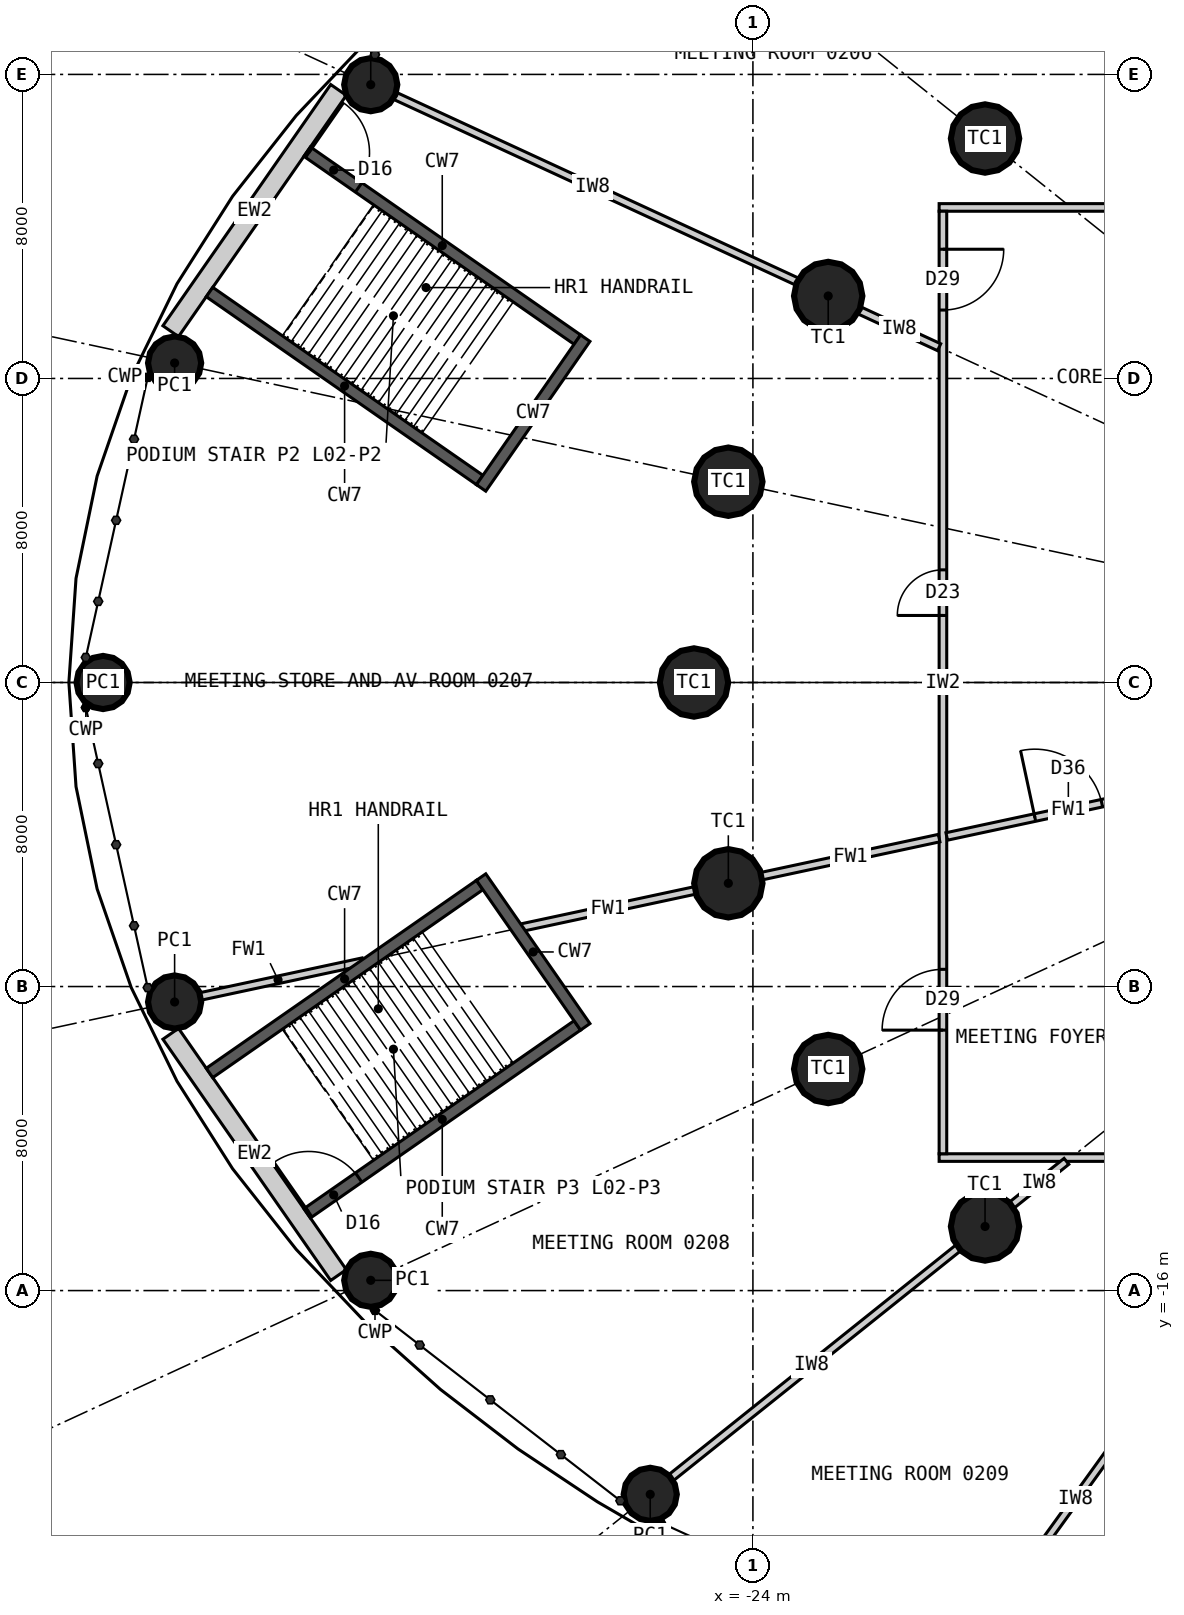
"""IFC4 building model, lengths in metres.
Left out: names, types, materials, properties, quantities, classifications, styles, units other than length and angle.
Written with IfcOpenShell. Run it as: python <this file> out.ifc"""

import sys

from ifc_helpers import new_model, si_unit, direction, frame, frame_2d, origin, origin_2d, place, context, subcontext, project, spatial, rectangle, circle, extrude, element, fill, save


model = new_model("IFC4")
c1 = context("Model", 3, precision=1e-05, world=origin(), true_north=direction((0.0, 1.0)))
c2 = subcontext(c1, "Body", "Model", "MODEL_VIEW")
j1 = project(units=[si_unit("LENGTHUNIT", "METRE"), si_unit("PLANEANGLEUNIT", "RADIAN")], contexts=[c1])
p1 = place(None, origin())
s1 = spatial("IfcSite", under=j1, at=p1, CompositionType="ELEMENT")
p2 = place(p1, origin())
s2 = spatial("IfcBuilding", under=s1, at=p2, CompositionType="ELEMENT")
p3 = place(p2, frame((0.0, 0.0, 13.8)))
s3 = spatial("IfcBuildingStorey", under=s2, at=p3, CompositionType="ELEMENT", Elevation=13.8)
for number, where, z_axis, x_axis in (
    (1, (-17.892, 14.313, 0.0), (0.0, 0.0, 1.0), (1.0, 0.0, 0.0)),
    (2, (-22.019, 10.17, 0.0), (0.0, 0.0, 1.0), (1.0, 0.0, 0.0)),
    (3, (-24.647, 5.283, 0.0), (0.0, 0.0, 1.0), (1.0, 0.0, 0.0)),
    (4, (-25.55, 0.0, 0.0), (0.0, 0.0, 1.0), (1.0, 0.0, 0.0)),
    (5, (-24.647, -5.283, 0.0), (0.0, 0.0, 1.0), (1.0, 0.0, 0.0)),
    (6, (-22.019, -10.17, 0.0), (0.0, 0.0, 1.0), (1.0, 0.0, 0.0)),
    (7, (-17.892, -14.313, 0.0), (0.0, 0.0, 1.0), (1.0, 0.0, 0.0)),
):
    element("IfcColumn", number, at=place(p3, frame(where, z_axis=z_axis, x_axis=x_axis)), inside=s3, PredefinedType="COLUMN", context=c2, shape_type="SweptSolid", body=[
        extrude(circle(Radius=0.9, at=origin_2d()), origin(), (0.0, 0.0, 1.0), 5.4),
    ])
for number, where, z_axis, x_axis in (
    (8, (-34.057, 15.73, 0.0), (0.0, 0.0, 1.0), (1.0, 0.0, 0.0)),
    (9, (-39.218, 8.407, 0.0), (0.0, 0.0, 1.0), (1.0, 0.0, 0.0)),
    (10, (-41.1, 0.0, 0.0), (0.0, 0.0, 1.0), (1.0, 0.0, 0.0)),
    (11, (-39.218, -8.407, 0.0), (0.0, 0.0, 1.0), (1.0, 0.0, 0.0)),
    (12, (-34.057, -15.73, 0.0), (0.0, 0.0, 1.0), (1.0, 0.0, 0.0)),
    (13, (-26.702, -21.362, 0.0), (0.0, 0.0, 1.0), (1.0, 0.0, 0.0)),
):
    element("IfcColumn", number, at=place(p3, frame(where, z_axis=z_axis, x_axis=x_axis)), inside=s3, PredefinedType="COLUMN", context=c2, shape_type="SweptSolid", body=[
        extrude(circle(Radius=0.7, at=origin_2d()), origin(), (0.0, 0.0, 1.0), 5.4),
    ])
for number, where, z_axis, x_axis in (
    (14, (-34.905, 15.592, 0.0), (0.0, 0.0, 1.0), (-0.571, -0.821, 0.0)),
    (15, (-39.32, -9.244, 0.0), (0.0, 0.0, 1.0), (0.571, -0.821, 0.0)),
):
    element("IfcWall", number, at=place(p3, frame(where, z_axis=z_axis, x_axis=x_axis)), inside=s3, PredefinedType="SOLIDWALL", context=c2, shape_type="SweptSolid", body=[
        extrude(rectangle(XDim=7.733, YDim=0.5, at=frame_2d((3.866, 0.0))), origin(), (0.0, 0.0, 1.0), 5.15),
    ])
p4 = place(p3, frame((-19.1, 12.5, 0.0), z_axis=(0.0, 0.0, 1.0), x_axis=(1.0, 0.0, 0.0)))
e16 = element("IfcWall", 16, at=p4, inside=s3, PredefinedType="PARTITIONING", context=c2, shape_type="SweptSolid", body=[
    extrude(rectangle(XDim=38.2, YDim=0.2, at=frame_2d((19.1, 0.0))), origin(), (0.0, 0.0, 1.0), 5.15),
])
p5 = place(p4, frame((26.32, 0.0, 0.0)))
e17 = element("IfcOpeningElement", 17, at=p5, cuts=e16, PredefinedType="OPENING", context=c2, shape_type="SweptSolid", body=[
    extrude(rectangle(XDim=1.6, YDim=2.4, at=frame_2d((0.8, 1.2))), frame((0.0, 0.11, 0.0), z_axis=(0.0, -1.0, 0.0), x_axis=(1.0, 0.0, 0.0)), (0.0, 0.0, 1.0), 0.22),
])
p6 = place(p4, frame((20.71, 0.0, 0.0)))
e18 = element("IfcOpeningElement", 18, at=p6, cuts=e16, PredefinedType="OPENING", context=c2, shape_type="SweptSolid", body=[
    extrude(rectangle(XDim=1.0, YDim=2.1, at=frame_2d((0.5, 1.05))), frame((0.0, 0.11, 0.0), z_axis=(0.0, -1.0, 0.0), x_axis=(1.0, 0.0, 0.0)), (0.0, 0.0, 1.0), 0.22),
])
p7 = place(p4, frame((16.49, 0.0, 0.0)))
e19 = element("IfcOpeningElement", 19, at=p7, cuts=e16, PredefinedType="OPENING", context=c2, shape_type="SweptSolid", body=[
    extrude(rectangle(XDim=1.0, YDim=2.1, at=frame_2d((0.5, 1.05))), frame((0.0, 0.11, 0.0), z_axis=(0.0, -1.0, 0.0), x_axis=(1.0, 0.0, 0.0)), (0.0, 0.0, 1.0), 0.22),
])
p8 = place(p4, frame((11.943, 0.0, 0.0)))
e20 = element("IfcOpeningElement", 20, at=p8, cuts=e16, PredefinedType="OPENING", context=c2, shape_type="SweptSolid", body=[
    extrude(rectangle(XDim=1.0, YDim=2.2, at=frame_2d((0.5, 1.1))), frame((0.0, 0.11, 0.0), z_axis=(0.0, -1.0, 0.0), x_axis=(1.0, 0.0, 0.0)), (0.0, 0.0, 1.0), 0.22),
])
p9 = place(p4, frame((5.1, 0.0, 0.0)))
e21 = element("IfcOpeningElement", 21, at=p9, cuts=e16, PredefinedType="OPENING", context=c2, shape_type="SweptSolid", body=[
    extrude(rectangle(XDim=1.6, YDim=2.4, at=frame_2d((0.8, 1.2))), frame((0.0, 0.11, 0.0), z_axis=(0.0, -1.0, 0.0), x_axis=(1.0, 0.0, 0.0)), (0.0, 0.0, 1.0), 0.22),
])
p10 = place(p4, frame((33.02, 0.0, 0.0)))
e22 = element("IfcOpeningElement", 22, at=p10, cuts=e16, PredefinedType="OPENING", context=c2, shape_type="SweptSolid", body=[
    extrude(rectangle(XDim=1.6, YDim=2.4, at=frame_2d((0.8, 1.2))), frame((0.0, 0.11, 0.0), z_axis=(0.0, -1.0, 0.0), x_axis=(1.0, 0.0, 0.0)), (0.0, 0.0, 1.0), 0.22),
])
p11 = place(p3, frame((19.1, -12.5, 0.0), z_axis=(0.0, 0.0, 1.0), x_axis=(-1.0, 0.0, 0.0)))
e23 = element("IfcWall", 23, at=p11, inside=s3, PredefinedType="PARTITIONING", context=c2, shape_type="SweptSolid", body=[
    extrude(rectangle(XDim=38.2, YDim=0.2, at=frame_2d((19.1, 0.0))), origin(), (0.0, 0.0, 1.0), 5.15),
])
p12 = place(p11, frame((30.722, 0.0, 0.0)))
e24 = element("IfcOpeningElement", 24, at=p12, cuts=e23, PredefinedType="OPENING", context=c2, shape_type="SweptSolid", body=[
    extrude(rectangle(XDim=1.6, YDim=2.4, at=frame_2d((0.8, 1.2))), frame((0.0, 0.11, 0.0), z_axis=(0.0, -1.0, 0.0), x_axis=(1.0, 0.0, 0.0)), (0.0, 0.0, 1.0), 0.22),
])
p13 = place(p11, frame((19.079, 0.0, 0.0)))
e25 = element("IfcOpeningElement", 25, at=p13, cuts=e23, PredefinedType="OPENING", context=c2, shape_type="SweptSolid", body=[
    extrude(rectangle(XDim=1.8, YDim=2.4, at=frame_2d((0.9, 1.2))), frame((0.0, 0.11, 0.0), z_axis=(0.0, -1.0, 0.0), x_axis=(1.0, 0.0, 0.0)), (0.0, 0.0, 1.0), 0.22),
])
p14 = place(p11, frame((25.979, 0.0, 0.0)))
e26 = element("IfcOpeningElement", 26, at=p14, cuts=e23, PredefinedType="OPENING", context=c2, shape_type="SweptSolid", body=[
    extrude(rectangle(XDim=1.8, YDim=2.4, at=frame_2d((0.9, 1.2))), frame((0.0, 0.11, 0.0), z_axis=(0.0, -1.0, 0.0), x_axis=(1.0, 0.0, 0.0)), (0.0, 0.0, 1.0), 0.22),
])
p15 = place(p3, frame((-19.0, 12.4, 0.0), z_axis=(0.0, 0.0, 1.0), x_axis=(0.0, -1.0, 0.0)))
e27 = element("IfcWall", 27, at=p15, inside=s3, PredefinedType="PARTITIONING", context=c2, shape_type="SweptSolid", body=[
    extrude(rectangle(XDim=24.8, YDim=0.2, at=frame_2d((12.4, 0.0))), origin(), (0.0, 0.0, 1.0), 5.15),
])
p16 = place(p15, frame((9.436, 0.0, 0.0)))
e28 = element("IfcOpeningElement", 28, at=p16, cuts=e27, PredefinedType="OPENING", context=c2, shape_type="SweptSolid", body=[
    extrude(rectangle(XDim=1.2, YDim=2.2, at=frame_2d((0.6, 1.1))), frame((0.0, 0.11, 0.0), z_axis=(0.0, -1.0, 0.0), x_axis=(1.0, 0.0, 0.0)), (0.0, 0.0, 1.0), 0.22),
])
p17 = place(p15, frame((19.947, 0.0, 0.0)))
e29 = element("IfcOpeningElement", 29, at=p17, cuts=e27, PredefinedType="OPENING", context=c2, shape_type="SweptSolid", body=[
    extrude(rectangle(XDim=1.6, YDim=2.4, at=frame_2d((0.8, 1.2))), frame((0.0, 0.11, 0.0), z_axis=(0.0, -1.0, 0.0), x_axis=(1.0, 0.0, 0.0)), (0.0, 0.0, 1.0), 0.22),
])
p18 = place(p15, frame((1.0, 0.0, 0.0)))
e30 = element("IfcOpeningElement", 30, at=p18, cuts=e27, PredefinedType="OPENING", context=c2, shape_type="SweptSolid", body=[
    extrude(rectangle(XDim=1.6, YDim=2.4, at=frame_2d((0.8, 1.2))), frame((0.0, 0.11, 0.0), z_axis=(0.0, -1.0, 0.0), x_axis=(1.0, 0.0, 0.0)), (0.0, 0.0, 1.0), 0.22),
])
p19 = place(p3, frame((-19.1, 8.822, 0.0), z_axis=(0.0, 0.0, 1.0), x_axis=(-0.907872952542, 0.419245395971, 0.0)))
e31 = element("IfcWall", 31, at=p19, inside=s3, PredefinedType="PARTITIONING", context=c2, shape_type="SweptSolid", body=[
    extrude(rectangle(XDim=2.315, YDim=0.2, at=frame_2d((1.158, 0.0))), origin(), (0.0, 0.0, 1.0), 4.45),
])
p20 = place(p3, frame((-22.836, 10.548, 0.0), z_axis=(0.0, 0.0, 1.0), x_axis=(-0.90784065247, 0.419315334471, 0.0)))
e32 = element("IfcWall", 32, at=p20, inside=s3, PredefinedType="PARTITIONING", context=c2, shape_type="SweptSolid", body=[
    extrude(rectangle(XDim=11.86, YDim=0.2, at=frame_2d((5.93, 0.0))), origin(), (0.0, 0.0, 1.0), 4.25),
])
p21 = place(p3, frame((-19.1, -4.094, 0.0), z_axis=(0.0, 0.0, 1.0), x_axis=(-0.977784445586, -0.209612924148, 0.0)))
e33 = element("IfcWall", 33, at=p21, inside=s3, PredefinedType="PARTITIONING", context=c2, shape_type="SweptSolid", body=[
    extrude(rectangle(XDim=4.773, YDim=0.2, at=frame_2d((2.386, 0.0))), origin(), (0.0, 0.0, 1.0), 4.3),
])
p22 = place(p3, frame((-25.527, -5.472, 0.0), z_axis=(0.0, 0.0, 1.0), x_axis=(-0.977787143577, -0.209600338396, 0.0)))
e34 = element("IfcWall", 34, at=p22, inside=s3, PredefinedType="PARTITIONING", context=c2, shape_type="SweptSolid", body=[
    extrude(rectangle(XDim=4.68, YDim=0.2, at=frame_2d((2.34, 0.0))), origin(), (0.0, 0.0, 1.0), 4.25),
])
p23 = place(p3, frame((-34.263, -7.345, 0.0), z_axis=(0.0, 0.0, 1.0), x_axis=(-0.977794589892, -0.209565598271, 0.0)))
e35 = element("IfcWall", 35, at=p23, inside=s3, PredefinedType="PARTITIONING", context=c2, shape_type="SweptSolid", body=[
    extrude(rectangle(XDim=4.567, YDim=0.2, at=frame_2d((2.283, 0.0))), origin(), (0.0, 0.0, 1.0), 4.25),
])
p24 = place(p3, frame((-15.75, -12.6, 0.0), z_axis=(0.0, 0.0, 1.0), x_axis=(-0.780881734892, -0.6246788904, 0.0)))
e36 = element("IfcWall", 36, at=p24, inside=s3, PredefinedType="PARTITIONING", context=c2, shape_type="SweptSolid", body=[
    extrude(rectangle(XDim=1.843, YDim=0.2, at=frame_2d((0.921, 0.0))), origin(), (0.0, 0.0, 1.0), 4.3),
])
p25 = place(p3, frame((-18.594, -14.875, 0.0), z_axis=(0.0, 0.0, 1.0), x_axis=(-0.780868809443, -0.624695047554, 0.0)))
e37 = element("IfcWall", 37, at=p25, inside=s3, PredefinedType="PARTITIONING", context=c2, shape_type="SweptSolid", body=[
    extrude(rectangle(XDim=9.883, YDim=0.2, at=frame_2d((4.941, 0.0))), origin(), (0.0, 0.0, 1.0), 4.25),
])
p26 = place(p3, frame((-13.118, -18.176, 0.0), z_axis=(0.0, 0.0, 1.0), x_axis=(-0.585204349301, -0.810885854828, 0.0)))
e38 = element("IfcWall", 38, at=p26, inside=s3, PredefinedType="PARTITIONING", context=c2, shape_type="SweptSolid", body=[
    extrude(rectangle(XDim=8.161, YDim=0.2, at=frame_2d((4.081, 0.0))), origin(), (0.0, 0.0, 1.0), 4.25),
])
p27 = place(p3, frame((-35.729, 13.968, 0.0), z_axis=(0.0, 0.0, 1.0), x_axis=(0.82092761123, -0.571032273274, 0.0)))
e39 = element("IfcWall", 39, at=p27, inside=s3, PredefinedType="SHEAR", context=c2, shape_type="SweptSolid", body=[
    extrude(rectangle(XDim=8.66, YDim=0.3, at=frame_2d((4.33, 0.0))), origin(), (0.0, 0.0, 1.0), 5.4),
])
p28 = place(p27, frame((0.05, 0.0, 0.0)))
e40 = element("IfcOpeningElement", 40, at=p28, cuts=e39, PredefinedType="OPENING", context=c2, shape_type="SweptSolid", body=[
    extrude(rectangle(XDim=1.6, YDim=2.1, at=frame_2d((0.8, 1.05))), frame((0.0, 0.16, 0.0), z_axis=(0.0, -1.0, 0.0), x_axis=(1.0, 0.0, 0.0)), (0.0, 0.0, 1.0), 0.32),
])
p29 = place(p3, frame((-38.299, 10.274, 0.0), z_axis=(0.0, 0.0, 1.0), x_axis=(0.820936803751, -0.571019057692, 0.0)))
e41 = element("IfcWall", 41, at=p29, inside=s3, PredefinedType="SHEAR", context=c2, shape_type="SweptSolid", body=[
    extrude(rectangle(XDim=8.66, YDim=0.3, at=frame_2d((4.33, 0.0))), origin(), (0.0, 0.0, 1.0), 5.4),
])
p30 = place(p3, frame((-28.412, 9.06, 0.0), z_axis=(0.0, 0.0, 1.0), x_axis=(-0.571036173178, -0.820924898467, 0.0)))
e42 = element("IfcWall", 42, at=p30, inside=s3, PredefinedType="SHEAR", context=c2, shape_type="SweptSolid", body=[
    extrude(rectangle(XDim=4.8, YDim=0.3, at=frame_2d((2.4, 0.0))), origin(), (0.0, 0.0, 1.0), 5.4),
])
p31 = place(p3, frame((-38.299, -10.274, 0.0), z_axis=(0.0, 0.0, 1.0), x_axis=(0.820936803751, 0.571019057692, 0.0)))
e43 = element("IfcWall", 43, at=p31, inside=s3, PredefinedType="SHEAR", context=c2, shape_type="SweptSolid", body=[
    extrude(rectangle(XDim=8.66, YDim=0.3, at=frame_2d((4.33, 0.0))), origin(), (0.0, 0.0, 1.0), 5.4),
])
p32 = place(p3, frame((-35.729, -13.968, 0.0), z_axis=(0.0, 0.0, 1.0), x_axis=(0.82092761123, 0.571032273274, 0.0)))
e44 = element("IfcWall", 44, at=p32, inside=s3, PredefinedType="SHEAR", context=c2, shape_type="SweptSolid", body=[
    extrude(rectangle(XDim=8.66, YDim=0.3, at=frame_2d((4.33, 0.0))), origin(), (0.0, 0.0, 1.0), 5.4),
])
p33 = place(p32, frame((0.05, 0.0, 0.0)))
e45 = element("IfcOpeningElement", 45, at=p33, cuts=e44, PredefinedType="OPENING", context=c2, shape_type="SweptSolid", body=[
    extrude(rectangle(XDim=1.6, YDim=2.1, at=frame_2d((0.8, 1.05))), frame((0.0, 0.16, 0.0), z_axis=(0.0, -1.0, 0.0), x_axis=(1.0, 0.0, 0.0)), (0.0, 0.0, 1.0), 0.32),
])
p34 = place(p3, frame((-31.153, -5.12, 0.0), z_axis=(0.0, 0.0, 1.0), x_axis=(0.571036173178, -0.820924898467, 0.0)))
e46 = element("IfcWall", 46, at=p34, inside=s3, PredefinedType="SHEAR", context=c2, shape_type="SweptSolid", body=[
    extrude(rectangle(XDim=4.8, YDim=0.3, at=frame_2d((2.4, 0.0))), origin(), (0.0, 0.0, 1.0), 5.4),
])
p35 = place(p3, frame((-18.9, -4.052, 0.0), z_axis=(0.0, 0.0, 1.0), x_axis=(0.977781666858, 0.2096258857, 0.0)))
e47 = element("IfcWall", 47, at=p35, inside=s3, PredefinedType="PARTITIONING", context=c2, shape_type="SweptSolid", body=[
    extrude(rectangle(XDim=6.545, YDim=0.2, at=frame_2d((3.273, 0.0))), origin(), (0.0, 0.0, 1.0), 5.15),
])
p36 = place(p35, frame((2.373, 0.0, 0.0)))
e48 = element("IfcOpeningElement", 48, at=p36, cuts=e47, PredefinedType="OPENING", context=c2, shape_type="SweptSolid", body=[
    extrude(rectangle(XDim=1.8, YDim=2.4, at=frame_2d((0.9, 1.2))), frame((0.0, 0.11, 0.0), z_axis=(0.0, -1.0, 0.0), x_axis=(1.0, 0.0, 0.0)), (0.0, 0.0, 1.0), 0.22),
])
p37 = place(p28, origin())
e49 = element("IfcDoor", 49, at=p37, inside=s3, OperationType="SINGLE_SWING_LEFT", PredefinedType="DOOR", context=c2, shape_type="SweptSolid", body=[
    extrude(rectangle(XDim=1.6, YDim=2.1, at=frame_2d((0.8, 1.05))), frame((0.0, 0.025, 0.0), z_axis=(0.0, -1.0, 0.0), x_axis=(1.0, 0.0, 0.0)), (0.0, 0.0, 1.0), 0.05),
])
fill(e40, e49)
p38 = place(p33, origin())
e50 = element("IfcDoor", 50, at=p38, inside=s3, OperationType="SINGLE_SWING_LEFT", PredefinedType="DOOR", context=c2, shape_type="SweptSolid", body=[
    extrude(rectangle(XDim=1.6, YDim=2.1, at=frame_2d((0.8, 1.05))), frame((0.0, 0.025, 0.0), z_axis=(0.0, -1.0, 0.0), x_axis=(1.0, 0.0, 0.0)), (0.0, 0.0, 1.0), 0.05),
])
fill(e45, e50)
p39 = place(p16, origin())
e51 = element("IfcDoor", 51, at=p39, inside=s3, OperationType="SINGLE_SWING_RIGHT", PredefinedType="DOOR", context=c2, shape_type="SweptSolid", body=[
    extrude(rectangle(XDim=1.2, YDim=2.2, at=frame_2d((0.6, 1.1))), frame((0.0, 0.025, 0.0), z_axis=(0.0, -1.0, 0.0), x_axis=(1.0, 0.0, 0.0)), (0.0, 0.0, 1.0), 0.05),
])
fill(e28, e51)
p40 = place(p17, origin())
e52 = element("IfcDoor", 52, at=p40, inside=s3, OperationType="DOUBLE_DOOR_DOUBLE_SWING", PredefinedType="DOOR", context=c2, shape_type="SweptSolid", body=[
    extrude(rectangle(XDim=1.6, YDim=2.4, at=frame_2d((0.8, 1.2))), frame((0.0, 0.025, 0.0), z_axis=(0.0, -1.0, 0.0), x_axis=(1.0, 0.0, 0.0)), (0.0, 0.0, 1.0), 0.05),
])
fill(e29, e52)
p41 = place(p36, origin())
e53 = element("IfcDoor", 53, at=p41, inside=s3, OperationType="DOUBLE_DOOR_DOUBLE_SWING", PredefinedType="DOOR", context=c2, shape_type="SweptSolid", body=[
    extrude(rectangle(XDim=1.8, YDim=2.4, at=frame_2d((0.9, 1.2))), frame((0.0, 0.025, 0.0), z_axis=(0.0, -1.0, 0.0), x_axis=(1.0, 0.0, 0.0)), (0.0, 0.0, 1.0), 0.05),
])
fill(e48, e53)
p42 = place(p18, origin())
e54 = element("IfcDoor", 54, at=p42, inside=s3, OperationType="DOUBLE_DOOR_DOUBLE_SWING", PredefinedType="DOOR", context=c2, shape_type="SweptSolid", body=[
    extrude(rectangle(XDim=1.6, YDim=2.4, at=frame_2d((0.8, 1.2))), frame((0.0, 0.025, 0.0), z_axis=(0.0, -1.0, 0.0), x_axis=(1.0, 0.0, 0.0)), (0.0, 0.0, 1.0), 0.05),
])
fill(e30, e54)
save(model, sys.argv[1])
